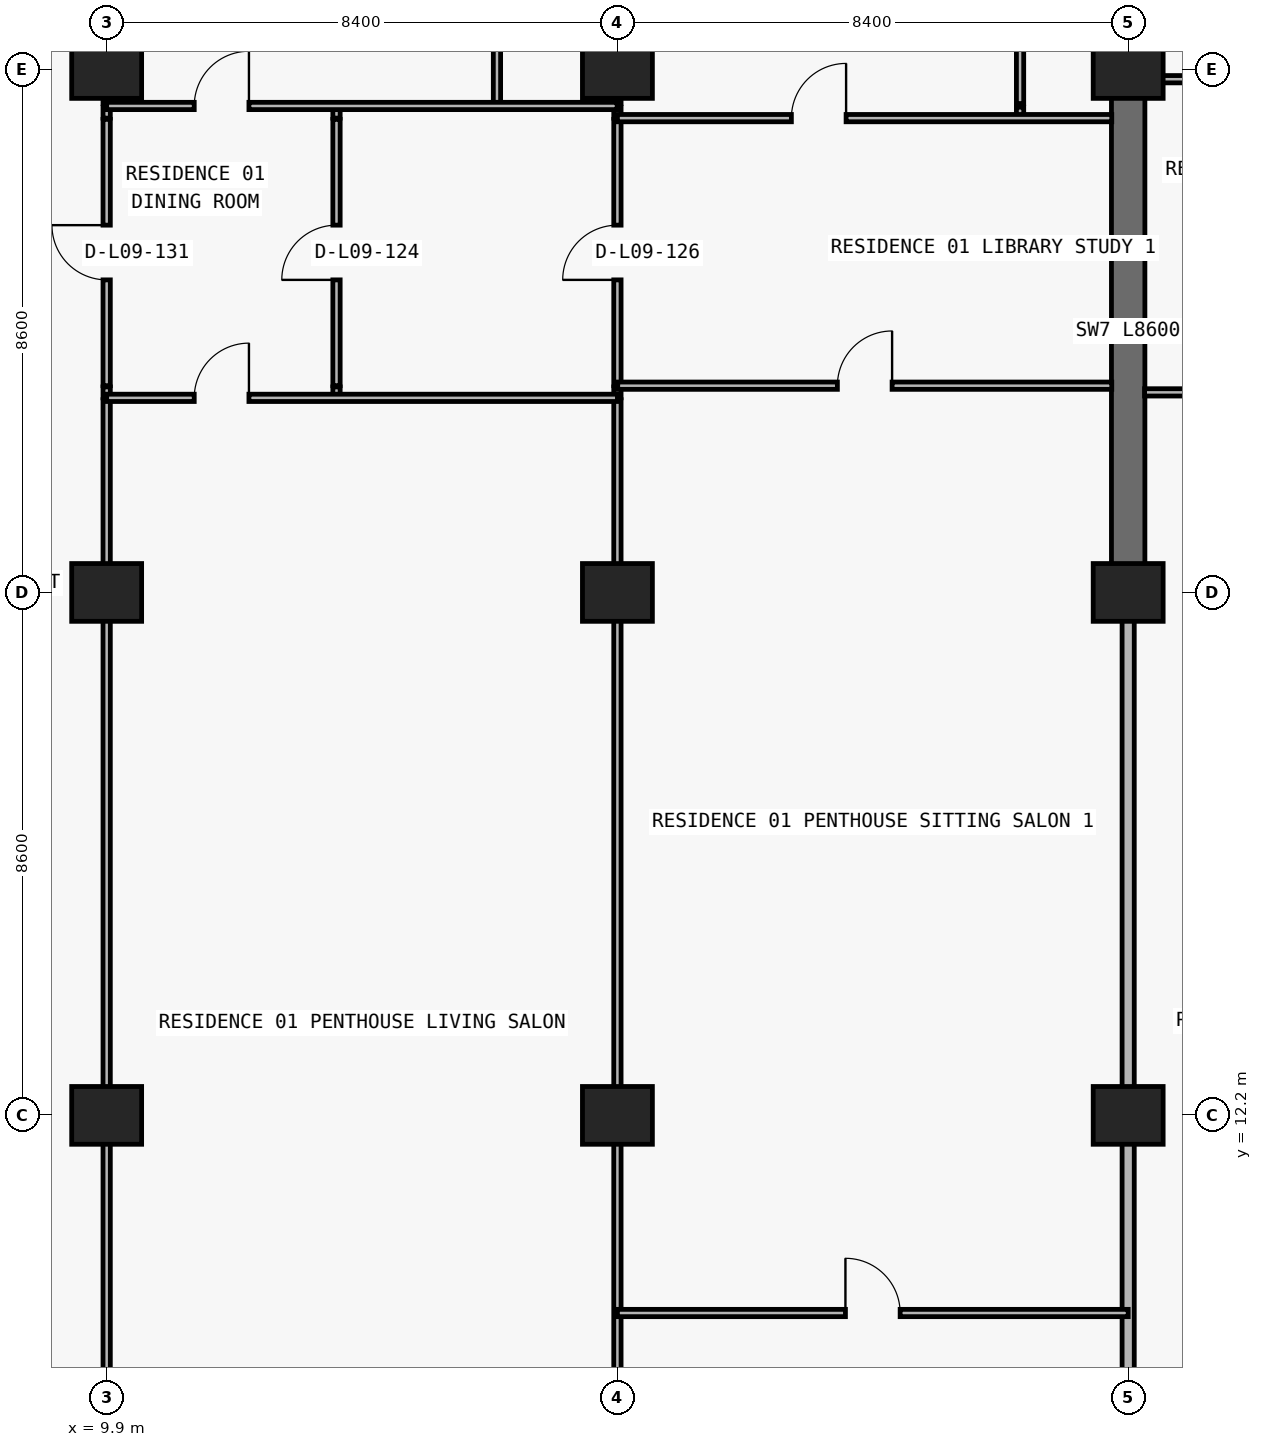
"""IFC4 building model, lengths in metres.
Left out: names, types, materials, properties, quantities, classifications, styles, units other than length and angle.
Written with IfcOpenShell. Run it as: python <this file> out.ifc"""

import sys

from ifc_helpers import new_model, si_unit, direction, frame, frame_2d, origin, origin_2d, place, context, subcontext, project, spatial, rectangle, extrude, element, fill, save


model = new_model("IFC4")
c1 = context("Model", 3, precision=1e-05, world=origin(), true_north=direction((0.0, 1.0)))
c2 = subcontext(c1, "Body", "Model", "MODEL_VIEW")
j1 = project(units=[si_unit("LENGTHUNIT", "METRE"), si_unit("PLANEANGLEUNIT", "RADIAN")], contexts=[c1])
p1 = place(None, origin())
s1 = spatial("IfcSite", under=j1, at=p1, CompositionType="ELEMENT")
p2 = place(p1, origin())
s2 = spatial("IfcBuilding", under=s1, at=p2, CompositionType="ELEMENT")
p3 = place(p2, frame((0.0, 0.0, 39.9)))
s3 = spatial("IfcBuildingStorey", under=s2, at=p3, CompositionType="ELEMENT", Elevation=39.9)
for number, where, z_axis, x_axis in (
    (1, (9.9, 12.2, 0.0), (0.0, 0.0, 1.0), (1.0, 0.0, 0.0)),
    (2, (18.3, 12.2, 0.0), (0.0, 0.0, 1.0), (1.0, 0.0, 0.0)),
    (3, (26.7, 12.2, 0.0), (0.0, 0.0, 1.0), (1.0, 0.0, 0.0)),
    (4, (9.9, 20.8, 0.0), (0.0, 0.0, 1.0), (1.0, 0.0, 0.0)),
    (5, (18.3, 20.8, 0.0), (0.0, 0.0, 1.0), (1.0, 0.0, 0.0)),
    (6, (26.7, 20.8, 0.0), (0.0, 0.0, 1.0), (1.0, 0.0, 0.0)),
    (7, (9.9, 29.4, 0.0), (0.0, 0.0, 1.0), (1.0, 0.0, 0.0)),
    (8, (18.3, 29.4, 0.0), (0.0, 0.0, 1.0), (1.0, 0.0, 0.0)),
    (9, (26.7, 29.4, 0.0), (0.0, 0.0, 1.0), (1.0, 0.0, 0.0)),
):
    element("IfcColumn", number, at=place(p3, frame(where, z_axis=z_axis, x_axis=x_axis)), inside=s3, PredefinedType="COLUMN", context=c2, shape_type="SweptSolid", body=[
        extrude(rectangle(XDim=1.15, YDim=0.95, at=origin_2d()), origin(), (0.0, 0.0, 1.0), 3.05),
    ])
p4 = place(p3, frame((26.7, 20.8, 0.0), z_axis=(0.0, 0.0, 1.0), x_axis=(0.0, 1.0, 0.0)))
e10 = element("IfcWall", 10, at=p4, inside=s3, PredefinedType="SHEAR", context=c2, shape_type="SweptSolid", body=[
    extrude(rectangle(XDim=8.6, YDim=0.55, at=frame_2d((4.3, 0.0))), origin(), (0.0, 0.0, 1.0), 3.05),
])
p5 = place(p3, frame((9.9, 6.24, 0.0), z_axis=(0.0, 0.0, 1.0), x_axis=(0.0, 1.0, 0.0)))
e11 = element("IfcWall", 11, at=p5, inside=s3, PredefinedType="PARTITIONING", context=c2, shape_type="SweptSolid", body=[
    extrude(rectangle(XDim=17.73, YDim=0.12, at=frame_2d((8.865, 0.0))), origin(), (0.0, 0.0, 1.0), 2.11),
])
p6 = place(p3, frame((9.9, 24.0, 0.0), z_axis=(0.0, 0.0, 1.0), x_axis=(0.0, 1.0, 0.0)))
e12 = element("IfcWall", 12, at=p6, inside=s3, PredefinedType="PARTITIONING", context=c2, shape_type="SweptSolid", body=[
    extrude(rectangle(XDim=0.18, YDim=0.12, at=frame_2d((0.09, 0.0))), origin(), (0.0, 0.0, 1.0), 2.11),
])
p7 = place(p3, frame((9.9, 24.2, 0.0), z_axis=(0.0, 0.0, 1.0), x_axis=(0.0, 1.0, 0.0)))
e13 = element("IfcWall", 13, at=p7, inside=s3, PredefinedType="PARTITIONING", context=c2, shape_type="SweptSolid", body=[
    extrude(rectangle(XDim=4.38, YDim=0.12, at=frame_2d((2.19, 0.0))), origin(), (0.0, 0.0, 1.0), 2.11),
])
p8 = place(p7, frame((1.74, 0.0, 0.0)))
e14 = element("IfcOpeningElement", 14, at=p8, cuts=e13, PredefinedType="OPENING", context=c2, shape_type="SweptSolid", body=[
    extrude(rectangle(XDim=0.9, YDim=2.06, at=frame_2d((0.45, 1.03))), frame((0.0, 0.07, 0.0), z_axis=(0.0, -1.0, 0.0), x_axis=(1.0, 0.0, 0.0)), (0.0, 0.0, 1.0), 0.14),
])
p9 = place(p3, frame((9.9, 28.6, 0.0), z_axis=(0.0, 0.0, 1.0), x_axis=(0.0, 1.0, 0.0)))
e15 = element("IfcWall", 15, at=p9, inside=s3, PredefinedType="PARTITIONING", context=c2, shape_type="SweptSolid", body=[
    extrude(rectangle(XDim=0.18, YDim=0.12, at=frame_2d((0.09, 0.0))), origin(), (0.0, 0.0, 1.0), 2.11),
])
p10 = place(p3, frame((9.9, 28.84, 0.0), z_axis=(0.0, 0.0, 1.0), x_axis=(0.0, 1.0, 0.0)))
e16 = element("IfcWall", 16, at=p10, inside=s3, PredefinedType="PARTITIONING", context=c2, shape_type="SweptSolid", body=[
    extrude(rectangle(XDim=5.16, YDim=0.12, at=frame_2d((2.58, 0.0))), origin(), (0.0, 0.0, 1.0), 2.11),
])
p11 = place(p3, frame((13.68, 24.0, 0.0), z_axis=(0.0, 0.0, 1.0), x_axis=(0.0, 1.0, 0.0)))
e17 = element("IfcWall", 17, at=p11, inside=s3, PredefinedType="PARTITIONING", context=c2, shape_type="SweptSolid", body=[
    extrude(rectangle(XDim=0.18, YDim=0.12, at=frame_2d((0.09, 0.0))), origin(), (0.0, 0.0, 1.0), 3.05),
])
p12 = place(p3, frame((13.68, 24.2, 0.0), z_axis=(0.0, 0.0, 1.0), x_axis=(0.0, 1.0, 0.0)))
e18 = element("IfcWall", 18, at=p12, inside=s3, PredefinedType="PARTITIONING", context=c2, shape_type="SweptSolid", body=[
    extrude(rectangle(XDim=4.38, YDim=0.12, at=frame_2d((2.19, 0.0))), origin(), (0.0, 0.0, 1.0), 3.05),
])
p13 = place(p12, frame((1.74, 0.0, 0.0)))
e19 = element("IfcOpeningElement", 19, at=p13, cuts=e18, PredefinedType="OPENING", context=c2, shape_type="SweptSolid", body=[
    extrude(rectangle(XDim=0.9, YDim=2.15, at=frame_2d((0.45, 1.075))), frame((0.0, 0.07, 0.0), z_axis=(0.0, -1.0, 0.0), x_axis=(1.0, 0.0, 0.0)), (0.0, 0.0, 1.0), 0.14),
])
p14 = place(p3, frame((13.68, 28.6, 0.0), z_axis=(0.0, 0.0, 1.0), x_axis=(0.0, 1.0, 0.0)))
e20 = element("IfcWall", 20, at=p14, inside=s3, PredefinedType="PARTITIONING", context=c2, shape_type="SweptSolid", body=[
    extrude(rectangle(XDim=0.18, YDim=0.12, at=frame_2d((0.09, 0.0))), origin(), (0.0, 0.0, 1.0), 3.05),
])
p15 = place(p3, frame((16.319, 28.84, 0.0), z_axis=(0.0, 0.0, 1.0), x_axis=(0.0, 1.0, 0.0)))
e21 = element("IfcWall", 21, at=p15, inside=s3, PredefinedType="PARTITIONING", context=c2, shape_type="SweptSolid", body=[
    extrude(rectangle(XDim=5.16, YDim=0.12, at=frame_2d((2.58, 0.0))), origin(), (0.0, 0.0, 1.0), 2.578),
])
p16 = place(p15, frame((2.155, 0.0, 0.0)))
e22 = element("IfcOpeningElement", 22, at=p16, cuts=e21, PredefinedType="OPENING", context=c2, shape_type="SweptSolid", body=[
    extrude(rectangle(XDim=0.85, YDim=2.1, at=frame_2d((0.425, 1.05))), frame((0.0, 0.07, 0.0), z_axis=(0.0, -1.0, 0.0), x_axis=(1.0, 0.0, 0.0)), (0.0, 0.0, 1.0), 0.14),
])
p17 = place(p3, frame((18.3, 6.24, 0.0), z_axis=(0.0, 0.0, 1.0), x_axis=(0.0, 1.0, 0.0)))
e23 = element("IfcWall", 23, at=p17, inside=s3, PredefinedType="PARTITIONING", context=c2, shape_type="SweptSolid", body=[
    extrude(rectangle(XDim=17.73, YDim=0.12, at=frame_2d((8.865, 0.0))), origin(), (0.0, 0.0, 1.0), 2.11),
])
p18 = place(p3, frame((18.3, 24.0, 0.0), z_axis=(0.0, 0.0, 1.0), x_axis=(0.0, 1.0, 0.0)))
e24 = element("IfcWall", 24, at=p18, inside=s3, PredefinedType="PARTITIONING", context=c2, shape_type="SweptSolid", body=[
    extrude(rectangle(XDim=0.18, YDim=0.12, at=frame_2d((0.09, 0.0))), origin(), (0.0, 0.0, 1.0), 2.11),
])
p19 = place(p3, frame((18.3, 24.2, 0.0), z_axis=(0.0, 0.0, 1.0), x_axis=(0.0, 1.0, 0.0)))
e25 = element("IfcWall", 25, at=p19, inside=s3, PredefinedType="PARTITIONING", context=c2, shape_type="SweptSolid", body=[
    extrude(rectangle(XDim=4.38, YDim=0.12, at=frame_2d((2.19, 0.0))), origin(), (0.0, 0.0, 1.0), 2.11),
])
p20 = place(p19, frame((1.74, 0.0, 0.0)))
e26 = element("IfcOpeningElement", 26, at=p20, cuts=e25, PredefinedType="OPENING", context=c2, shape_type="SweptSolid", body=[
    extrude(rectangle(XDim=0.9, YDim=2.06, at=frame_2d((0.45, 1.03))), frame((0.0, 0.07, 0.0), z_axis=(0.0, -1.0, 0.0), x_axis=(1.0, 0.0, 0.0)), (0.0, 0.0, 1.0), 0.14),
])
p21 = place(p3, frame((18.3, 28.6, 0.0), z_axis=(0.0, 0.0, 1.0), x_axis=(0.0, 1.0, 0.0)))
e27 = element("IfcWall", 27, at=p21, inside=s3, PredefinedType="PARTITIONING", context=c2, shape_type="SweptSolid", body=[
    extrude(rectangle(XDim=0.18, YDim=0.12, at=frame_2d((0.09, 0.0))), origin(), (0.0, 0.0, 1.0), 2.11),
])
p22 = place(p3, frame((18.3, 28.84, 0.0), z_axis=(0.0, 0.0, 1.0), x_axis=(0.0, 1.0, 0.0)))
e28 = element("IfcWall", 28, at=p22, inside=s3, PredefinedType="PARTITIONING", context=c2, shape_type="SweptSolid", body=[
    extrude(rectangle(XDim=5.16, YDim=0.12, at=frame_2d((2.58, 0.0))), origin(), (0.0, 0.0, 1.0), 2.11),
])
p23 = place(p3, frame((24.922, 28.6, 0.0), z_axis=(0.0, 0.0, 1.0), x_axis=(0.0, 1.0, 0.0)))
e29 = element("IfcWall", 29, at=p23, inside=s3, PredefinedType="PARTITIONING", context=c2, shape_type="SweptSolid", body=[
    extrude(rectangle(XDim=0.18, YDim=0.12, at=frame_2d((0.09, 0.0))), origin(), (0.0, 0.0, 1.0), 3.05),
])
p24 = place(p3, frame((24.922, 28.84, 0.0), z_axis=(0.0, 0.0, 1.0), x_axis=(0.0, 1.0, 0.0)))
e30 = element("IfcWall", 30, at=p24, inside=s3, PredefinedType="PARTITIONING", context=c2, shape_type="SweptSolid", body=[
    extrude(rectangle(XDim=5.16, YDim=0.12, at=frame_2d((2.58, 0.0))), origin(), (0.0, 0.0, 1.0), 3.05),
])
p25 = place(p24, frame((2.155, 0.0, 0.0)))
e31 = element("IfcOpeningElement", 31, at=p25, cuts=e30, PredefinedType="OPENING", context=c2, shape_type="SweptSolid", body=[
    extrude(rectangle(XDim=0.85, YDim=2.1, at=frame_2d((0.425, 1.05))), frame((0.0, 0.07, 0.0), z_axis=(0.0, -1.0, 0.0), x_axis=(1.0, 0.0, 0.0)), (0.0, 0.0, 1.0), 0.14),
])
p26 = place(p3, frame((26.7, 6.24, 0.0), z_axis=(0.0, 0.0, 1.0), x_axis=(0.0, 1.0, 0.0)))
e32 = element("IfcWall", 32, at=p26, inside=s3, PredefinedType="PARTITIONING", context=c2, shape_type="SweptSolid", body=[
    extrude(rectangle(XDim=14.555, YDim=0.2, at=frame_2d((7.277, 0.0))), origin(), (0.0, 0.0, 1.0), 2.11),
])
p27 = place(p3, frame((26.7, 29.405, 0.0), z_axis=(0.0, 0.0, 1.0), x_axis=(0.0, 1.0, 0.0)))
e33 = element("IfcWall", 33, at=p27, inside=s3, PredefinedType="PARTITIONING", context=c2, shape_type="SweptSolid", body=[
    extrude(rectangle(XDim=4.595, YDim=0.2, at=frame_2d((2.297, 0.0))), origin(), (0.0, 0.0, 1.0), 2.335),
])
p28 = place(p3, frame((18.3, 8.95, 0.0), z_axis=(0.0, 0.0, 1.0), x_axis=(1.0, 0.0, 0.0)))
e34 = element("IfcWall", 34, at=p28, inside=s3, PredefinedType="PARTITIONING", context=c2, shape_type="SweptSolid", body=[
    extrude(rectangle(XDim=8.4, YDim=0.12, at=frame_2d((4.2, 0.0))), origin(), (0.0, 0.0, 1.0), 3.05),
])
p29 = place(p28, frame((3.75, 0.0, 0.0)))
e35 = element("IfcOpeningElement", 35, at=p29, cuts=e34, PredefinedType="OPENING", context=c2, shape_type="SweptSolid", body=[
    extrude(rectangle(XDim=0.9, YDim=2.15, at=frame_2d((0.45, 1.075))), frame((0.0, 0.07, 0.0), z_axis=(0.0, -1.0, 0.0), x_axis=(1.0, 0.0, 0.0)), (0.0, 0.0, 1.0), 0.14),
])
p30 = place(p3, frame((9.9, 24.0, 0.0), z_axis=(0.0, 0.0, 1.0), x_axis=(1.0, 0.0, 0.0)))
e36 = element("IfcWall", 36, at=p30, inside=s3, PredefinedType="PARTITIONING", context=c2, shape_type="SweptSolid", body=[
    extrude(rectangle(XDim=8.4, YDim=0.12, at=frame_2d((4.2, 0.0))), origin(), (0.0, 0.0, 1.0), 3.05),
])
p31 = place(p30, frame((1.44, 0.0, 0.0)))
e37 = element("IfcOpeningElement", 37, at=p31, cuts=e36, PredefinedType="OPENING", context=c2, shape_type="SweptSolid", body=[
    extrude(rectangle(XDim=0.9, YDim=2.15, at=frame_2d((0.45, 1.075))), frame((0.0, 0.07, 0.0), z_axis=(0.0, -1.0, 0.0), x_axis=(1.0, 0.0, 0.0)), (0.0, 0.0, 1.0), 0.14),
])
p32 = place(p3, frame((26.97, 24.09, 0.0), z_axis=(0.0, 0.0, 1.0), x_axis=(1.0, 0.0, 0.0)))
e38 = element("IfcWall", 38, at=p32, inside=s3, PredefinedType="PARTITIONING", context=c2, shape_type="SweptSolid", body=[
    extrude(rectangle(XDim=8.13, YDim=0.12, at=frame_2d((4.065, 0.0))), origin(), (0.0, 0.0, 1.0), 3.05),
])
p33 = place(p32, frame((1.558, 0.0, 0.0)))
e39 = element("IfcOpeningElement", 39, at=p33, cuts=e38, PredefinedType="OPENING", context=c2, shape_type="SweptSolid", body=[
    extrude(rectangle(XDim=0.9, YDim=2.15, at=frame_2d((0.45, 1.075))), frame((0.0, 0.07, 0.0), z_axis=(0.0, -1.0, 0.0), x_axis=(1.0, 0.0, 0.0)), (0.0, 0.0, 1.0), 0.14),
])
p34 = place(p32, frame((5.79, 0.0, 0.0)))
e40 = element("IfcOpeningElement", 40, at=p34, cuts=e38, PredefinedType="OPENING", context=c2, shape_type="SweptSolid", body=[
    extrude(rectangle(XDim=0.9, YDim=2.15, at=frame_2d((0.45, 1.075))), frame((0.0, 0.07, 0.0), z_axis=(0.0, -1.0, 0.0), x_axis=(1.0, 0.0, 0.0)), (0.0, 0.0, 1.0), 0.14),
])
p35 = place(p3, frame((18.305, 24.2, 0.0), z_axis=(0.0, 0.0, 1.0), x_axis=(1.0, 0.0, 0.0)))
e41 = element("IfcWall", 41, at=p35, inside=s3, PredefinedType="PARTITIONING", context=c2, shape_type="SweptSolid", body=[
    extrude(rectangle(XDim=8.125, YDim=0.12, at=frame_2d((4.062, 0.0))), origin(), (0.0, 0.0, 1.0), 3.05),
])
p36 = place(p35, frame((3.613, 0.0, 0.0)))
e42 = element("IfcOpeningElement", 42, at=p36, cuts=e41, PredefinedType="OPENING", context=c2, shape_type="SweptSolid", body=[
    extrude(rectangle(XDim=0.9, YDim=2.15, at=frame_2d((0.45, 1.075))), frame((0.0, 0.07, 0.0), z_axis=(0.0, -1.0, 0.0), x_axis=(1.0, 0.0, 0.0)), (0.0, 0.0, 1.0), 0.14),
])
p37 = place(p3, frame((18.3, 28.6, 0.0), z_axis=(0.0, 0.0, 1.0), x_axis=(1.0, 0.0, 0.0)))
e43 = element("IfcWall", 43, at=p37, inside=s3, PredefinedType="PARTITIONING", context=c2, shape_type="SweptSolid", body=[
    extrude(rectangle(XDim=8.13, YDim=0.12, at=frame_2d((4.065, 0.0))), origin(), (0.0, 0.0, 1.0), 3.05),
])
p38 = place(p37, frame((2.861, 0.0, 0.0)))
e44 = element("IfcOpeningElement", 44, at=p38, cuts=e43, PredefinedType="OPENING", context=c2, shape_type="SweptSolid", body=[
    extrude(rectangle(XDim=0.9, YDim=2.15, at=frame_2d((0.45, 1.075))), frame((0.0, 0.07, 0.0), z_axis=(0.0, -1.0, 0.0), x_axis=(1.0, 0.0, 0.0)), (0.0, 0.0, 1.0), 0.14),
])
p39 = place(p3, frame((9.9, 28.8, 0.0), z_axis=(0.0, 0.0, 1.0), x_axis=(1.0, 0.0, 0.0)))
e45 = element("IfcWall", 45, at=p39, inside=s3, PredefinedType="PARTITIONING", context=c2, shape_type="SweptSolid", body=[
    extrude(rectangle(XDim=8.395, YDim=0.12, at=frame_2d((4.198, 0.0))), origin(), (0.0, 0.0, 1.0), 3.05),
])
p40 = place(p39, frame((1.44, 0.0, 0.0)))
e46 = element("IfcOpeningElement", 46, at=p40, cuts=e45, PredefinedType="OPENING", context=c2, shape_type="SweptSolid", body=[
    extrude(rectangle(XDim=0.9, YDim=2.15, at=frame_2d((0.45, 1.075))), frame((0.0, 0.07, 0.0), z_axis=(0.0, -1.0, 0.0), x_axis=(1.0, 0.0, 0.0)), (0.0, 0.0, 1.0), 0.14),
])
p41 = place(p3, frame((26.97, 29.24, 0.0), z_axis=(0.0, 0.0, 1.0), x_axis=(1.0, 0.0, 0.0)))
e47 = element("IfcWall", 47, at=p41, inside=s3, PredefinedType="PARTITIONING", context=c2, shape_type="SweptSolid", body=[
    extrude(rectangle(XDim=8.13, YDim=0.12, at=frame_2d((4.065, 0.0))), origin(), (0.0, 0.0, 1.0), 2.11),
])
p42 = place(p41, frame((1.558, 0.0, 0.0)))
e48 = element("IfcOpeningElement", 48, at=p42, cuts=e47, PredefinedType="OPENING", context=c2, shape_type="SweptSolid", body=[
    extrude(rectangle(XDim=0.9, YDim=2.06, at=frame_2d((0.45, 1.03))), frame((0.0, 0.07, 0.0), z_axis=(0.0, -1.0, 0.0), x_axis=(1.0, 0.0, 0.0)), (0.0, 0.0, 1.0), 0.14),
])
p43 = place(p40, origin())
e49 = element("IfcDoor", 49, at=p43, inside=s3, OperationType="SINGLE_SWING_RIGHT", PredefinedType="DOOR", context=c2, shape_type="SweptSolid", body=[
    extrude(rectangle(XDim=0.9, YDim=2.15, at=frame_2d((0.45, 1.075))), frame((0.0, 0.025, 0.0), z_axis=(0.0, -1.0, 0.0), x_axis=(1.0, 0.0, 0.0)), (0.0, 0.0, 1.0), 0.05),
])
fill(e46, e49)
p44 = place(p13, origin())
e50 = element("IfcDoor", 50, at=p44, inside=s3, OperationType="SINGLE_SWING_LEFT", PredefinedType="DOOR", context=c2, shape_type="SweptSolid", body=[
    extrude(rectangle(XDim=0.9, YDim=2.15, at=frame_2d((0.45, 1.075))), frame((0.0, 0.025, 0.0), z_axis=(0.0, -1.0, 0.0), x_axis=(1.0, 0.0, 0.0)), (0.0, 0.0, 1.0), 0.05),
])
fill(e19, e50)
p45 = place(p31, origin())
e51 = element("IfcDoor", 51, at=p45, inside=s3, OperationType="SINGLE_SWING_RIGHT", PredefinedType="DOOR", context=c2, shape_type="SweptSolid", body=[
    extrude(rectangle(XDim=0.9, YDim=2.15, at=frame_2d((0.45, 1.075))), frame((0.0, 0.025, 0.0), z_axis=(0.0, -1.0, 0.0), x_axis=(1.0, 0.0, 0.0)), (0.0, 0.0, 1.0), 0.05),
])
fill(e37, e51)
p46 = place(p20, origin())
e52 = element("IfcDoor", 52, at=p46, inside=s3, OperationType="SINGLE_SWING_LEFT", PredefinedType="DOOR", context=c2, shape_type="SweptSolid", body=[
    extrude(rectangle(XDim=0.9, YDim=2.06, at=frame_2d((0.45, 1.03))), frame((0.0, 0.025, 0.0), z_axis=(0.0, -1.0, 0.0), x_axis=(1.0, 0.0, 0.0)), (0.0, 0.0, 1.0), 0.05),
])
fill(e26, e52)
p47 = place(p38, origin())
e53 = element("IfcDoor", 53, at=p47, inside=s3, OperationType="SINGLE_SWING_RIGHT", PredefinedType="DOOR", context=c2, shape_type="SweptSolid", body=[
    extrude(rectangle(XDim=0.9, YDim=2.15, at=frame_2d((0.45, 1.075))), frame((0.0, 0.025, 0.0), z_axis=(0.0, -1.0, 0.0), x_axis=(1.0, 0.0, 0.0)), (0.0, 0.0, 1.0), 0.05),
])
fill(e44, e53)
p48 = place(p36, origin())
e54 = element("IfcDoor", 54, at=p48, inside=s3, OperationType="SINGLE_SWING_RIGHT", PredefinedType="DOOR", context=c2, shape_type="SweptSolid", body=[
    extrude(rectangle(XDim=0.9, YDim=2.15, at=frame_2d((0.45, 1.075))), frame((0.0, 0.025, 0.0), z_axis=(0.0, -1.0, 0.0), x_axis=(1.0, 0.0, 0.0)), (0.0, 0.0, 1.0), 0.05),
])
fill(e42, e54)
p49 = place(p29, origin())
e55 = element("IfcDoor", 55, at=p49, inside=s3, OperationType="SINGLE_SWING_LEFT", PredefinedType="DOOR", context=c2, shape_type="SweptSolid", body=[
    extrude(rectangle(XDim=0.9, YDim=2.15, at=frame_2d((0.45, 1.075))), frame((0.0, 0.025, 0.0), z_axis=(0.0, -1.0, 0.0), x_axis=(1.0, 0.0, 0.0)), (0.0, 0.0, 1.0), 0.05),
])
fill(e35, e55)
p50 = place(p8, origin())
e56 = element("IfcDoor", 56, at=p50, inside=s3, OperationType="SINGLE_SWING_RIGHT", PredefinedType="DOOR", context=c2, shape_type="SweptSolid", body=[
    extrude(rectangle(XDim=0.9, YDim=2.06, at=frame_2d((0.45, 1.03))), frame((0.0, 0.025, 0.0), z_axis=(0.0, -1.0, 0.0), x_axis=(1.0, 0.0, 0.0)), (0.0, 0.0, 1.0), 0.05),
])
fill(e14, e56)
save(model, sys.argv[1])
